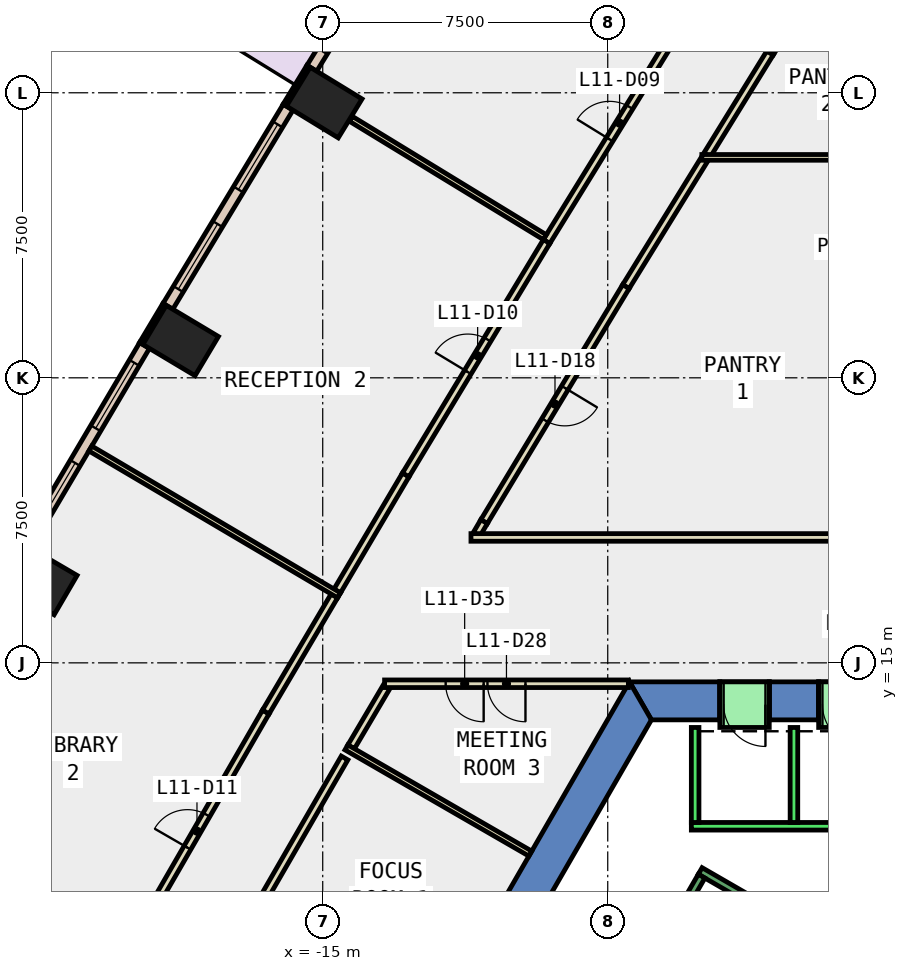
"""IFC4 building model, lengths in metres.
Left out: names, types, materials, properties, quantities, classifications, styles, units other than length and angle.
Written with IfcOpenShell. Run it as: python <this file> out.ifc"""

import sys

from ifc_helpers import new_model, si_unit, direction, frame, frame_2d, origin, origin_2d, place, context, subcontext, project, spatial, polyline, rectangle, outline, extrude, element, fill, save


model = new_model("IFC4")
c1 = context("Model", 3, precision=1e-05, world=origin(), true_north=direction((0.0, 1.0)))
c2 = subcontext(c1, "Body", "Model", "MODEL_VIEW")
j1 = project(units=[si_unit("LENGTHUNIT", "METRE"), si_unit("PLANEANGLEUNIT", "RADIAN")], contexts=[c1])
p1 = place(None, origin())
s1 = spatial("IfcSite", under=j1, at=p1, CompositionType="ELEMENT")
p2 = place(p1, origin())
s2 = spatial("IfcBuilding", under=s1, at=p2, CompositionType="ELEMENT")
p3 = place(p2, frame((0.0, 0.0, 56.0)))
s3 = spatial("IfcBuildingStorey", under=s2, at=p3, CompositionType="ELEMENT", Elevation=56.0)
for number, where, z_axis, x_axis in (
    (1, (-14.961, 29.743, -0.4), (0.0, 0.0, 1.0), (0.522, 0.853, 0.0)),
    (2, (-18.739, 23.482, -0.4), (0.0, 0.0, 1.0), (0.513, 0.858, 0.0)),
    (3, (-22.457, 17.186, -0.4), (0.0, 0.0, 1.0), (0.504, 0.864, 0.0)),
):
    element("IfcColumn", number, at=place(p3, frame(where, z_axis=z_axis, x_axis=x_axis)), inside=s3, PredefinedType="COLUMN", context=c2, shape_type="SweptSolid", body=[
        extrude(rectangle(XDim=1.2, YDim=1.6, at=origin_2d()), origin(), (0.0, 0.0, 1.0), 4.2),
    ])
p4 = place(p3, frame((0.0, 0.0, -0.4)))
e4 = element("IfcWall", 4, at=p4, inside=s3, PredefinedType="SHEAR", context=c2, shape_type="SweptSolid", body=[
    extrude(outline(polyline([(-3.25, 14.5), (-3.25, 13.5), (-1.95, 13.5), (-1.95, 14.5), (-3.25, 14.5)])), origin(), (0.0, 0.0, 1.0), 4.2),
])
p5 = place(p3, frame((0.0, 0.0, -0.4)))
e5 = element("IfcWall", 5, at=p5, inside=s3, PredefinedType="SHEAR", context=c2, shape_type="SweptSolid", body=[
    extrude(outline(polyline([(-4.55, 13.5), (-4.55, 14.5), (-6.928, 14.5), (-6.351, 13.5), (-4.55, 13.5)])), origin(), (0.0, 0.0, 1.0), 4.2),
])
p6 = place(p3, frame((0.0, 0.0, 3.6)))
e6 = element("IfcWall", 6, at=p6, inside=s3, PredefinedType="SHEAR", context=c2, shape_type="SweptSolid", body=[
    extrude(outline(polyline([(-1.95, 14.5), (-1.95, 13.5), (-0.65, 13.5), (-0.65, 14.5), (-1.95, 14.5)])), origin(), (0.0, 0.0, 1.0), 0.2),
])
p7 = place(p3, frame((0.0, 0.0, 3.6)))
e7 = element("IfcWall", 7, at=p7, inside=s3, PredefinedType="SHEAR", context=c2, shape_type="SweptSolid", body=[
    extrude(outline(polyline([(-4.55, 14.5), (-4.55, 13.5), (-3.25, 13.5), (-3.25, 14.5), (-4.55, 14.5)])), origin(), (0.0, 0.0, 1.0), 0.2),
])
p8 = place(p3, frame((0.0, 0.0, -0.4)))
e8 = element("IfcWall", 8, at=p8, inside=s3, PredefinedType="SHEAR", context=c2, shape_type="SweptSolid", body=[
    extrude(outline(polyline([(-12.267, 5.252), (-11.402, 4.752), (-6.351, 13.5), (-6.928, 14.5), (-12.267, 5.252)])), origin(), (0.0, 0.0, 1.0), 4.2),
])
for number, where, z_axis, x_axis in (
    (9, (-15.373, 30.698, 0.0), (0.0, 0.0, 1.0), (-0.522, -0.853, 0.0)),
    (10, (-19.161, 24.433, 0.0), (0.0, 0.0, 1.0), (-0.513, -0.858, 0.0)),
):
    element("IfcWall", number, at=place(p3, frame(where, z_axis=z_axis, x_axis=x_axis)), inside=s3, PredefinedType="STANDARD", context=c2, shape_type="SweptSolid", body=[
        extrude(rectangle(XDim=1.2, YDim=0.1, at=frame_2d((0.6, 0.0))), origin(), (0.0, 0.0, 1.0), 3.8),
    ])
p9 = place(p3, frame((-12.073, 35.853, 0.0), z_axis=(0.0, 0.0, 1.0), x_axis=(-0.525114088226, -0.851031840971, 0.0)))
e11 = element("IfcWall", 11, at=p9, inside=s3, PredefinedType="STANDARD", context=c2, shape_type="SweptSolid", body=[
    extrude(rectangle(XDim=6.121, YDim=0.3, at=frame_2d((3.061, 0.0))), origin(), (0.0, 0.0, 1.0), 3.8),
])
p10 = place(p9, frame((0.53, 0.0, 0.0)))
e12 = element("IfcOpeningElement", 12, at=p10, cuts=e11, PredefinedType="OPENING", context=c2, shape_type="SweptSolid", body=[
    extrude(rectangle(XDim=2.0, YDim=2.4, at=frame_2d((1.0, 1.2))), frame((0.0, 0.16, 0.0), z_axis=(0.0, -1.0, 0.0), x_axis=(1.0, 0.0, 0.0)), (0.0, 0.0, 1.0), 0.32),
])
p11 = place(p9, frame((3.591, 0.0, 0.9)))
e13 = element("IfcOpeningElement", 13, at=p11, cuts=e11, PredefinedType="OPENING", context=c2, shape_type="SweptSolid", body=[
    extrude(rectangle(XDim=2.0, YDim=2.6, at=frame_2d((1.0, 1.3))), frame((0.0, 0.16, 0.0), z_axis=(0.0, -1.0, 0.0), x_axis=(1.0, 0.0, 0.0)), (0.0, 0.0, 1.0), 0.32),
])
p12 = place(p3, frame((-15.911, 29.621, 0.0), z_axis=(0.0, 0.0, 1.0), x_axis=(-0.516699243123, -0.856166976796, 0.0)))
e14 = element("IfcWall", 14, at=p12, inside=s3, PredefinedType="STANDARD", context=c2, shape_type="SweptSolid", body=[
    extrude(rectangle(XDim=6.122, YDim=0.3, at=frame_2d((3.061, 0.0))), origin(), (0.0, 0.0, 1.0), 3.8),
])
p13 = place(p12, frame((0.53, 0.0, 0.9)))
e15 = element("IfcOpeningElement", 15, at=p13, cuts=e14, PredefinedType="OPENING", context=c2, shape_type="SweptSolid", body=[
    extrude(rectangle(XDim=2.0, YDim=2.6, at=frame_2d((1.0, 1.3))), frame((0.0, 0.16, 0.0), z_axis=(0.0, -1.0, 0.0), x_axis=(1.0, 0.0, 0.0)), (0.0, 0.0, 1.0), 0.32),
])
p14 = place(p12, frame((3.591, 0.0, 0.9)))
e16 = element("IfcOpeningElement", 16, at=p14, cuts=e14, PredefinedType="OPENING", context=c2, shape_type="SweptSolid", body=[
    extrude(rectangle(XDim=2.0, YDim=2.6, at=frame_2d((1.0, 1.3))), frame((0.0, 0.16, 0.0), z_axis=(0.0, -1.0, 0.0), x_axis=(1.0, 0.0, 0.0)), (0.0, 0.0, 1.0), 0.32),
])
p15 = place(p3, frame((-19.688, 23.351, 0.0), z_axis=(0.0, 0.0, 1.0), x_axis=(-0.508412153373, -0.861113861404, 0.0)))
e17 = element("IfcWall", 17, at=p15, inside=s3, PredefinedType="STANDARD", context=c2, shape_type="SweptSolid", body=[
    extrude(rectangle(XDim=6.121, YDim=0.3, at=frame_2d((3.061, 0.0))), origin(), (0.0, 0.0, 1.0), 3.8),
])
p16 = place(p15, frame((0.53, 0.0, 0.9)))
e18 = element("IfcOpeningElement", 18, at=p16, cuts=e17, PredefinedType="OPENING", context=c2, shape_type="SweptSolid", body=[
    extrude(rectangle(XDim=2.0, YDim=2.6, at=frame_2d((1.0, 1.3))), frame((0.0, 0.16, 0.0), z_axis=(0.0, -1.0, 0.0), x_axis=(1.0, 0.0, 0.0)), (0.0, 0.0, 1.0), 0.32),
])
p17 = place(p15, frame((3.591, 0.0, 0.9)))
e19 = element("IfcOpeningElement", 19, at=p17, cuts=e17, PredefinedType="OPENING", context=c2, shape_type="SweptSolid", body=[
    extrude(rectangle(XDim=2.0, YDim=2.6, at=frame_2d((1.0, 1.3))), frame((0.0, 0.16, 0.0), z_axis=(0.0, -1.0, 0.0), x_axis=(1.0, 0.0, 0.0)), (0.0, 0.0, 1.0), 0.32),
])
p18 = place(p3, frame((-14.425, 12.497, 0.0), z_axis=(0.0, 0.0, 1.0), x_axis=(-0.500026519606, -0.866010092142, 0.0)))
e20 = element("IfcWall", 20, at=p18, inside=s3, PredefinedType="PARTITIONING", context=c2, shape_type="SweptSolid", body=[
    extrude(rectangle(XDim=4.796, YDim=0.2, at=frame_2d((2.398, 0.0))), origin(), (0.0, 0.0, 1.0), 3.8),
])
p19 = place(p3, frame((-13.323, 14.364, 0.0), z_axis=(0.0, 0.0, 1.0), x_axis=(-0.508274698505, -0.861195001646, 0.0)))
e21 = element("IfcWall", 21, at=p19, inside=s3, PredefinedType="PARTITIONING", context=c2, shape_type="SweptSolid", body=[
    extrude(rectangle(XDim=1.828, YDim=0.2, at=frame_2d((0.914, 0.0))), origin(), (0.0, 0.0, 1.0), 3.8),
])
p20 = place(p3, frame((-4.963, 28.236, 0.0), z_axis=(0.0, 0.0, 1.0), x_axis=(-0.525104448775, -0.851037788748, 0.0)))
e22 = element("IfcWall", 22, at=p20, inside=s3, PredefinedType="PARTITIONING", context=c2, shape_type="SweptSolid", body=[
    extrude(rectangle(XDim=3.921, YDim=0.2, at=frame_2d((1.961, 0.0))), origin(), (0.0, 0.0, 1.0), 3.8),
])
p21 = place(p3, frame((-7.022, 24.899, 0.0), z_axis=(0.0, 0.0, 1.0), x_axis=(-0.516755973305, -0.856132737403, 0.0)))
e23 = element("IfcWall", 23, at=p21, inside=s3, PredefinedType="PARTITIONING", context=c2, shape_type="SweptSolid", body=[
    extrude(rectangle(XDim=7.222, YDim=0.2, at=frame_2d((3.611, 0.0))), origin(), (0.0, 0.0, 1.0), 3.8),
])
p22 = place(p21, frame((3.111, 0.0, 0.0)))
e24 = element("IfcOpeningElement", 24, at=p22, cuts=e23, PredefinedType="OPENING", context=c2, shape_type="SweptSolid", body=[
    extrude(rectangle(XDim=1.0, YDim=2.1, at=frame_2d((0.5, 1.05))), frame((0.0, 0.11, 0.0), z_axis=(0.0, -1.0, 0.0), x_axis=(1.0, 0.0, 0.0)), (0.0, 0.0, 1.0), 0.22),
])
p23 = place(p3, frame((-10.754, 18.716, 0.0), z_axis=(0.0, 0.0, 1.0), x_axis=(-0.506880801681, -0.862016155815, 0.0)))
e25 = element("IfcWall", 25, at=p23, inside=s3, PredefinedType="PARTITIONING", context=c2, shape_type="SweptSolid", body=[
    extrude(rectangle(XDim=0.383, YDim=0.2, at=frame_2d((0.191, 0.0))), origin(), (0.0, 0.0, 1.0), 3.8),
])
p24 = place(p3, frame((0.027, 36.213, 0.0), z_axis=(0.0, 0.0, 1.0), x_axis=(-0.533299680037, -0.845926386438, 0.0)))
e26 = element("IfcWall", 26, at=p24, inside=s3, PredefinedType="PARTITIONING", context=c2, shape_type="SweptSolid", body=[
    extrude(rectangle(XDim=6.109, YDim=0.2, at=frame_2d((3.055, 0.0))), origin(), (0.0, 0.0, 1.0), 3.8),
])
p25 = place(p24, frame((2.554, 0.0, 0.0)))
e27 = element("IfcOpeningElement", 27, at=p25, cuts=e26, PredefinedType="OPENING", context=c2, shape_type="SweptSolid", body=[
    extrude(rectangle(XDim=1.0, YDim=2.1, at=frame_2d((0.5, 1.05))), frame((0.0, 0.11, 0.0), z_axis=(0.0, -1.0, 0.0), x_axis=(1.0, 0.0, 0.0)), (0.0, 0.0, 1.0), 0.22),
])
p26 = place(p3, frame((-3.231, 31.045, 0.0), z_axis=(0.0, 0.0, 1.0), x_axis=(-0.525078663571, -0.851053698107, 0.0)))
e28 = element("IfcWall", 28, at=p26, inside=s3, PredefinedType="PARTITIONING", context=c2, shape_type="SweptSolid", body=[
    extrude(rectangle(XDim=3.15, YDim=0.2, at=frame_2d((1.575, 0.0))), origin(), (0.0, 0.0, 1.0), 3.8),
])
p27 = place(p3, frame((-9.11, 26.085, 0.0), z_axis=(0.0, 0.0, 1.0), x_axis=(0.525007100846, 0.85109784635, 0.0)))
e29 = element("IfcWall", 29, at=p27, inside=s3, PredefinedType="PARTITIONING", context=c2, shape_type="SweptSolid", body=[
    extrude(rectangle(XDim=7.32, YDim=0.2, at=frame_2d((3.66, 0.0))), origin(), (0.0, 0.0, 1.0), 3.8),
])
p28 = place(p27, frame((3.16, 0.0, 0.0)))
e30 = element("IfcOpeningElement", 30, at=p28, cuts=e29, PredefinedType="OPENING", context=c2, shape_type="SweptSolid", body=[
    extrude(rectangle(XDim=1.0, YDim=2.1, at=frame_2d((0.5, 1.05))), frame((0.0, 0.11, 0.0), z_axis=(0.0, -1.0, 0.0), x_axis=(1.0, 0.0, 0.0)), (0.0, 0.0, 1.0), 0.22),
])
p29 = place(p3, frame((-14.618, 16.891, 0.0), z_axis=(0.0, 0.0, 1.0), x_axis=(0.508267810274, 0.861199067022, 0.0)))
e31 = element("IfcWall", 31, at=p29, inside=s3, PredefinedType="PARTITIONING", context=c2, shape_type="SweptSolid", body=[
    extrude(rectangle(XDim=3.547, YDim=0.2, at=frame_2d((1.774, 0.0))), origin(), (0.0, 0.0, 1.0), 3.8),
])
p30 = place(p3, frame((-12.815, 19.946, 0.0), z_axis=(0.0, 0.0, 1.0), x_axis=(0.516822021522, 0.856092867667, 0.0)))
e32 = element("IfcWall", 32, at=p30, inside=s3, PredefinedType="PARTITIONING", context=c2, shape_type="SweptSolid", body=[
    extrude(rectangle(XDim=7.171, YDim=0.2, at=frame_2d((3.585, 0.0))), origin(), (0.0, 0.0, 1.0), 3.8),
])
p31 = place(p30, frame((3.16, 0.0, 0.0)))
e33 = element("IfcOpeningElement", 33, at=p31, cuts=e32, PredefinedType="OPENING", context=c2, shape_type="SweptSolid", body=[
    extrude(rectangle(XDim=1.0, YDim=2.1, at=frame_2d((0.5, 1.05))), frame((0.0, 0.11, 0.0), z_axis=(0.0, -1.0, 0.0), x_axis=(1.0, 0.0, 0.0)), (0.0, 0.0, 1.0), 0.22),
])
p32 = place(p3, frame((-20.12, 7.434, 0.0), z_axis=(0.0, 0.0, 1.0), x_axis=(0.500039488902, 0.866002603656, 0.0)))
e34 = element("IfcWall", 34, at=p32, inside=s3, PredefinedType="PARTITIONING", context=c2, shape_type="SweptSolid", body=[
    extrude(rectangle(XDim=7.244, YDim=0.2, at=frame_2d((3.622, 0.0))), origin(), (0.0, 0.0, 1.0), 3.8),
])
p33 = place(p32, frame((3.122, 0.0, 0.0)))
e35 = element("IfcOpeningElement", 35, at=p33, cuts=e34, PredefinedType="OPENING", context=c2, shape_type="SweptSolid", body=[
    extrude(rectangle(XDim=1.0, YDim=2.1, at=frame_2d((0.5, 1.05))), frame((0.0, 0.11, 0.0), z_axis=(0.0, -1.0, 0.0), x_axis=(1.0, 0.0, 0.0)), (0.0, 0.0, 1.0), 0.22),
])
p34 = place(p3, frame((-16.498, 13.707, 0.0), z_axis=(0.0, 0.0, 1.0), x_axis=(0.508471945541, 0.861078556578, 0.0)))
e36 = element("IfcWall", 36, at=p34, inside=s3, PredefinedType="PARTITIONING", context=c2, shape_type="SweptSolid", body=[
    extrude(rectangle(XDim=3.548, YDim=0.2, at=frame_2d((1.774, 0.0))), origin(), (0.0, 0.0, 1.0), 3.8),
])
p35 = place(p3, frame((-14.377, 12.775, 0.0), z_axis=(0.0, 0.0, 1.0), x_axis=(0.866051730117, -0.499954398681, 0.0)))
e37 = element("IfcWall", 37, at=p35, inside=s3, PredefinedType="PARTITIONING", context=c2, shape_type="SweptSolid", body=[
    extrude(rectangle(XDim=5.588, YDim=0.15, at=frame_2d((2.794, 0.0))), origin(), (0.0, 0.0, 1.0), 3.8),
])
p36 = place(p3, frame((-6.957, 14.45, 0.0), z_axis=(0.0, 0.0, 1.0), x_axis=(-1.0, 0.0, 0.0)))
e38 = element("IfcWall", 38, at=p36, inside=s3, PredefinedType="PARTITIONING", context=c2, shape_type="SweptSolid", body=[
    extrude(rectangle(XDim=6.415, YDim=0.2, at=frame_2d((3.208, 0.0))), origin(), (0.0, 0.0, 1.0), 3.8),
])
p37 = place(p36, frame((2.708, 0.0, 0.0)))
e39 = element("IfcOpeningElement", 39, at=p37, cuts=e38, PredefinedType="OPENING", context=c2, shape_type="SweptSolid", body=[
    extrude(rectangle(XDim=1.0, YDim=2.1, at=frame_2d((0.5, 1.05))), frame((0.0, 0.11, 0.0), z_axis=(0.0, -1.0, 0.0), x_axis=(1.0, 0.0, 0.0)), (0.0, 0.0, 1.0), 0.22),
])
p38 = place(p36, frame((3.808, 0.0, 0.0)))
e40 = element("IfcOpeningElement", 40, at=p38, cuts=e38, PredefinedType="OPENING", context=c2, shape_type="SweptSolid", body=[
    extrude(rectangle(XDim=1.0, YDim=2.1, at=frame_2d((0.5, 1.05))), frame((0.0, 0.11, 0.0), z_axis=(0.0, -1.0, 0.0), x_axis=(1.0, 0.0, 0.0)), (0.0, 0.0, 1.0), 0.22),
])
p39 = place(p3, frame((-11.099, 18.3, 0.0), z_axis=(0.0, 0.0, 1.0), x_axis=(1.0, 0.0, 0.0)))
e41 = element("IfcWall", 41, at=p39, inside=s3, PredefinedType="PARTITIONING", context=c2, shape_type="SweptSolid", body=[
    extrude(rectangle(XDim=10.699, YDim=0.2, at=frame_2d((5.35, 0.0))), origin(), (0.0, 0.0, 1.0), 3.8),
])
p40 = place(p3, frame((-5.024, 28.3, 0.0), z_axis=(0.0, 0.0, 1.0), x_axis=(1.0, 0.0, 0.0)))
e42 = element("IfcWall", 42, at=p40, inside=s3, PredefinedType="PARTITIONING", context=c2, shape_type="SweptSolid", body=[
    extrude(rectangle(XDim=4.974, YDim=0.15, at=frame_2d((2.487, 0.0))), origin(), (0.0, 0.0, 1.0), 3.8),
])
p41 = place(p3, frame((-9.156, 26.201, 0.0), z_axis=(0.0, 0.0, 1.0), x_axis=(-0.853632819511, 0.520875234057, 0.0)))
e43 = element("IfcWall", 43, at=p41, inside=s3, PredefinedType="PARTITIONING", context=c2, shape_type="SweptSolid", body=[
    extrude(rectangle(XDim=5.98, YDim=0.15, at=frame_2d((2.99, 0.0))), origin(), (0.0, 0.0, 1.0), 3.8),
])
p42 = place(p3, frame((-14.57, 16.776, 0.0), z_axis=(0.0, 0.0, 1.0), x_axis=(-0.861124703857, 0.508393788718, 0.0)))
e44 = element("IfcWall", 44, at=p42, inside=s3, PredefinedType="PARTITIONING", context=c2, shape_type="SweptSolid", body=[
    extrude(rectangle(XDim=7.6, YDim=0.15, at=frame_2d((3.8, 0.0))), origin(), (0.0, 0.0, 1.0), 3.8),
])
p43 = place(p3, frame((5.3, 10.7, 0.0), z_axis=(0.0, 0.0, 1.0), x_axis=(-1.0, 0.0, 0.0)))
e45 = element("IfcWall", 45, at=p43, inside=s3, PredefinedType="STANDARD", context=c2, shape_type="SweptSolid", body=[
    extrude(rectangle(XDim=10.6, YDim=0.2, at=frame_2d((5.3, 0.0))), origin(), (0.0, 0.0, 1.0), 3.8),
])
for number, where, z_axis, x_axis in (
    (46, (-2.6, 10.8, 0.0), (0.0, 0.0, 1.0), (0.0, 1.0, 0.0)),
    (47, (-5.2, 10.8, 0.0), (0.0, 0.0, 1.0), (0.0, 1.0, 0.0)),
):
    element("IfcWall", number, at=place(p3, frame(where, z_axis=z_axis, x_axis=x_axis)), inside=s3, PredefinedType="STANDARD", context=c2, shape_type="SweptSolid", body=[
        extrude(rectangle(XDim=2.5, YDim=0.2, at=frame_2d((1.25, 0.0))), origin(), (0.0, 0.0, 1.0), 3.8),
    ])
p44 = place(p3, frame((-0.65, 13.9, 0.0), z_axis=(0.0, 0.0, 1.0), x_axis=(-1.0, 0.0, 0.0)))
e48 = element("IfcWall", 48, at=p44, inside=s3, PredefinedType="STANDARD", context=c2, shape_type="SweptSolid", body=[
    extrude(rectangle(XDim=1.3, YDim=1.2, at=frame_2d((0.65, 0.0))), origin(), (0.0, 0.0, 1.0), 2.4),
])
p45 = place(p44, frame((0.1, 0.0, 0.0)))
e49 = element("IfcOpeningElement", 49, at=p45, cuts=e48, PredefinedType="OPENING", context=c2, shape_type="SweptSolid", body=[
    extrude(rectangle(XDim=1.1, YDim=2.3, at=frame_2d((0.55, 1.15))), frame((0.0, 0.61, 0.0), z_axis=(0.0, -1.0, 0.0), x_axis=(1.0, 0.0, 0.0)), (0.0, 0.0, 1.0), 1.22),
])
p46 = place(p3, frame((-3.25, 13.9, 0.0), z_axis=(0.0, 0.0, 1.0), x_axis=(-1.0, 0.0, 0.0)))
e50 = element("IfcWall", 50, at=p46, inside=s3, PredefinedType="STANDARD", context=c2, shape_type="SweptSolid", body=[
    extrude(rectangle(XDim=1.3, YDim=1.2, at=frame_2d((0.65, 0.0))), origin(), (0.0, 0.0, 1.0), 2.4),
])
p47 = place(p46, frame((0.1, 0.0, 0.0)))
e51 = element("IfcOpeningElement", 51, at=p47, cuts=e50, PredefinedType="OPENING", context=c2, shape_type="SweptSolid", body=[
    extrude(rectangle(XDim=1.1, YDim=2.3, at=frame_2d((0.55, 1.15))), frame((0.0, 0.61, 0.0), z_axis=(0.0, -1.0, 0.0), x_axis=(1.0, 0.0, 0.0)), (0.0, 0.0, 1.0), 1.22),
])
p48 = place(p3, frame((-1.256, 7.324, 0.0), z_axis=(0.0, 0.0, 1.0), x_axis=(-0.866046073146, 0.499964197906, 0.0)))
e52 = element("IfcWall", 52, at=p48, inside=s3, PredefinedType="STANDARD", context=c2, shape_type="SweptSolid", body=[
    extrude(rectangle(XDim=4.4, YDim=0.2, at=frame_2d((2.2, 0.0))), origin(), (0.0, 0.0, 1.0), 3.8),
])
p49 = place(p48, frame((1.65, 0.0, 0.0)))
e53 = element("IfcOpeningElement", 53, at=p49, cuts=e52, PredefinedType="OPENING", context=c2, shape_type="SweptSolid", body=[
    extrude(rectangle(XDim=1.1, YDim=2.2, at=frame_2d((0.55, 1.1))), frame((0.0, 0.11, 0.0), z_axis=(0.0, -1.0, 0.0), x_axis=(1.0, 0.0, 0.0)), (0.0, 0.0, 1.0), 0.22),
])
p50 = place(p3, frame((-5.03, 9.388, 0.0), z_axis=(0.0, 0.0, 1.0), x_axis=(-0.499978703459, -0.866037698999, 0.0)))
e54 = element("IfcWall", 54, at=p50, inside=s3, PredefinedType="STANDARD", context=c2, shape_type="SweptSolid", body=[
    extrude(rectangle(XDim=6.9, YDim=0.2, at=frame_2d((3.45, 0.0))), origin(), (0.0, 0.0, 1.0), 3.8),
])
p51 = place(p13, origin())
e55 = element("IfcWindow", 55, at=p51, inside=s3, PartitioningType="SINGLE_PANEL", PredefinedType="WINDOW", context=c2, shape_type="SweptSolid", body=[
    extrude(rectangle(XDim=2.0, YDim=2.6, at=frame_2d((1.0, 1.3))), frame((0.0, 0.03, 0.0), z_axis=(0.0, -1.0, 0.0), x_axis=(1.0, 0.0, 0.0)), (0.0, 0.0, 1.0), 0.06),
])
fill(e15, e55)
p52 = place(p14, origin())
e56 = element("IfcWindow", 56, at=p52, inside=s3, PartitioningType="SINGLE_PANEL", PredefinedType="WINDOW", context=c2, shape_type="SweptSolid", body=[
    extrude(rectangle(XDim=2.0, YDim=2.6, at=frame_2d((1.0, 1.3))), frame((0.0, 0.03, 0.0), z_axis=(0.0, -1.0, 0.0), x_axis=(1.0, 0.0, 0.0)), (0.0, 0.0, 1.0), 0.06),
])
fill(e16, e56)
p53 = place(p16, origin())
e57 = element("IfcWindow", 57, at=p53, inside=s3, PartitioningType="SINGLE_PANEL", PredefinedType="WINDOW", context=c2, shape_type="SweptSolid", body=[
    extrude(rectangle(XDim=2.0, YDim=2.6, at=frame_2d((1.0, 1.3))), frame((0.0, 0.03, 0.0), z_axis=(0.0, -1.0, 0.0), x_axis=(1.0, 0.0, 0.0)), (0.0, 0.0, 1.0), 0.06),
])
fill(e18, e57)
p54 = place(p17, origin())
e58 = element("IfcWindow", 58, at=p54, inside=s3, PartitioningType="SINGLE_PANEL", PredefinedType="WINDOW", context=c2, shape_type="SweptSolid", body=[
    extrude(rectangle(XDim=2.0, YDim=2.6, at=frame_2d((1.0, 1.3))), frame((0.0, 0.03, 0.0), z_axis=(0.0, -1.0, 0.0), x_axis=(1.0, 0.0, 0.0)), (0.0, 0.0, 1.0), 0.06),
])
fill(e19, e58)
p55 = place(p28, origin())
e59 = element("IfcDoor", 59, at=p55, inside=s3, OperationType="SINGLE_SWING_RIGHT", PredefinedType="DOOR", context=c2, shape_type="SweptSolid", body=[
    extrude(rectangle(XDim=1.0, YDim=2.1, at=frame_2d((0.5, 1.05))), frame((0.0, 0.025, 0.0), z_axis=(0.0, -1.0, 0.0), x_axis=(1.0, 0.0, 0.0)), (0.0, 0.0, 1.0), 0.05),
])
fill(e30, e59)
p56 = place(p31, origin())
e60 = element("IfcDoor", 60, at=p56, inside=s3, OperationType="SINGLE_SWING_LEFT", PredefinedType="DOOR", context=c2, shape_type="SweptSolid", body=[
    extrude(rectangle(XDim=1.0, YDim=2.1, at=frame_2d((0.5, 1.05))), frame((0.0, 0.025, 0.0), z_axis=(0.0, -1.0, 0.0), x_axis=(1.0, 0.0, 0.0)), (0.0, 0.0, 1.0), 0.05),
])
fill(e33, e60)
p57 = place(p33, origin())
e61 = element("IfcDoor", 61, at=p57, inside=s3, OperationType="SINGLE_SWING_LEFT", PredefinedType="DOOR", context=c2, shape_type="SweptSolid", body=[
    extrude(rectangle(XDim=1.0, YDim=2.1, at=frame_2d((0.5, 1.05))), frame((0.0, 0.025, 0.0), z_axis=(0.0, -1.0, 0.0), x_axis=(1.0, 0.0, 0.0)), (0.0, 0.0, 1.0), 0.05),
])
fill(e35, e61)
p58 = place(p22, origin())
e62 = element("IfcDoor", 62, at=p58, inside=s3, OperationType="SINGLE_SWING_LEFT", PredefinedType="DOOR", context=c2, shape_type="SweptSolid", body=[
    extrude(rectangle(XDim=1.0, YDim=2.1, at=frame_2d((0.5, 1.05))), frame((0.0, 0.025, 0.0), z_axis=(0.0, -1.0, 0.0), x_axis=(1.0, 0.0, 0.0)), (0.0, 0.0, 1.0), 0.05),
])
fill(e24, e62)
p59 = place(p37, origin())
e63 = element("IfcDoor", 63, at=p59, inside=s3, OperationType="SINGLE_SWING_LEFT", PredefinedType="DOOR", context=c2, shape_type="SweptSolid", body=[
    extrude(rectangle(XDim=1.0, YDim=2.1, at=frame_2d((0.5, 1.05))), frame((0.0, 0.025, 0.0), z_axis=(0.0, -1.0, 0.0), x_axis=(1.0, 0.0, 0.0)), (0.0, 0.0, 1.0), 0.05),
])
fill(e39, e63)
p60 = place(p38, origin())
e64 = element("IfcDoor", 64, at=p60, inside=s3, OperationType="SINGLE_SWING_RIGHT", PredefinedType="DOOR", context=c2, shape_type="SweptSolid", body=[
    extrude(rectangle(XDim=1.0, YDim=2.1, at=frame_2d((0.5, 1.05))), frame((0.0, 0.025, 0.0), z_axis=(0.0, -1.0, 0.0), x_axis=(1.0, 0.0, 0.0)), (0.0, 0.0, 1.0), 0.05),
])
fill(e40, e64)
p61 = place(p45, origin())
e65 = element("IfcDoor", 65, at=p61, inside=s3, OperationType="SLIDING_TO_LEFT", PredefinedType="DOOR", context=c2, shape_type="SweptSolid", body=[
    extrude(rectangle(XDim=1.1, YDim=2.3, at=frame_2d((0.55, 1.15))), frame((0.0, 0.025, 0.0), z_axis=(0.0, -1.0, 0.0), x_axis=(1.0, 0.0, 0.0)), (0.0, 0.0, 1.0), 0.05),
])
fill(e49, e65)
p62 = place(p47, origin())
e66 = element("IfcDoor", 66, at=p62, inside=s3, OperationType="SLIDING_TO_LEFT", PredefinedType="DOOR", context=c2, shape_type="SweptSolid", body=[
    extrude(rectangle(XDim=1.1, YDim=2.3, at=frame_2d((0.55, 1.15))), frame((0.0, 0.025, 0.0), z_axis=(0.0, -1.0, 0.0), x_axis=(1.0, 0.0, 0.0)), (0.0, 0.0, 1.0), 0.05),
])
fill(e51, e66)
save(model, sys.argv[1])
